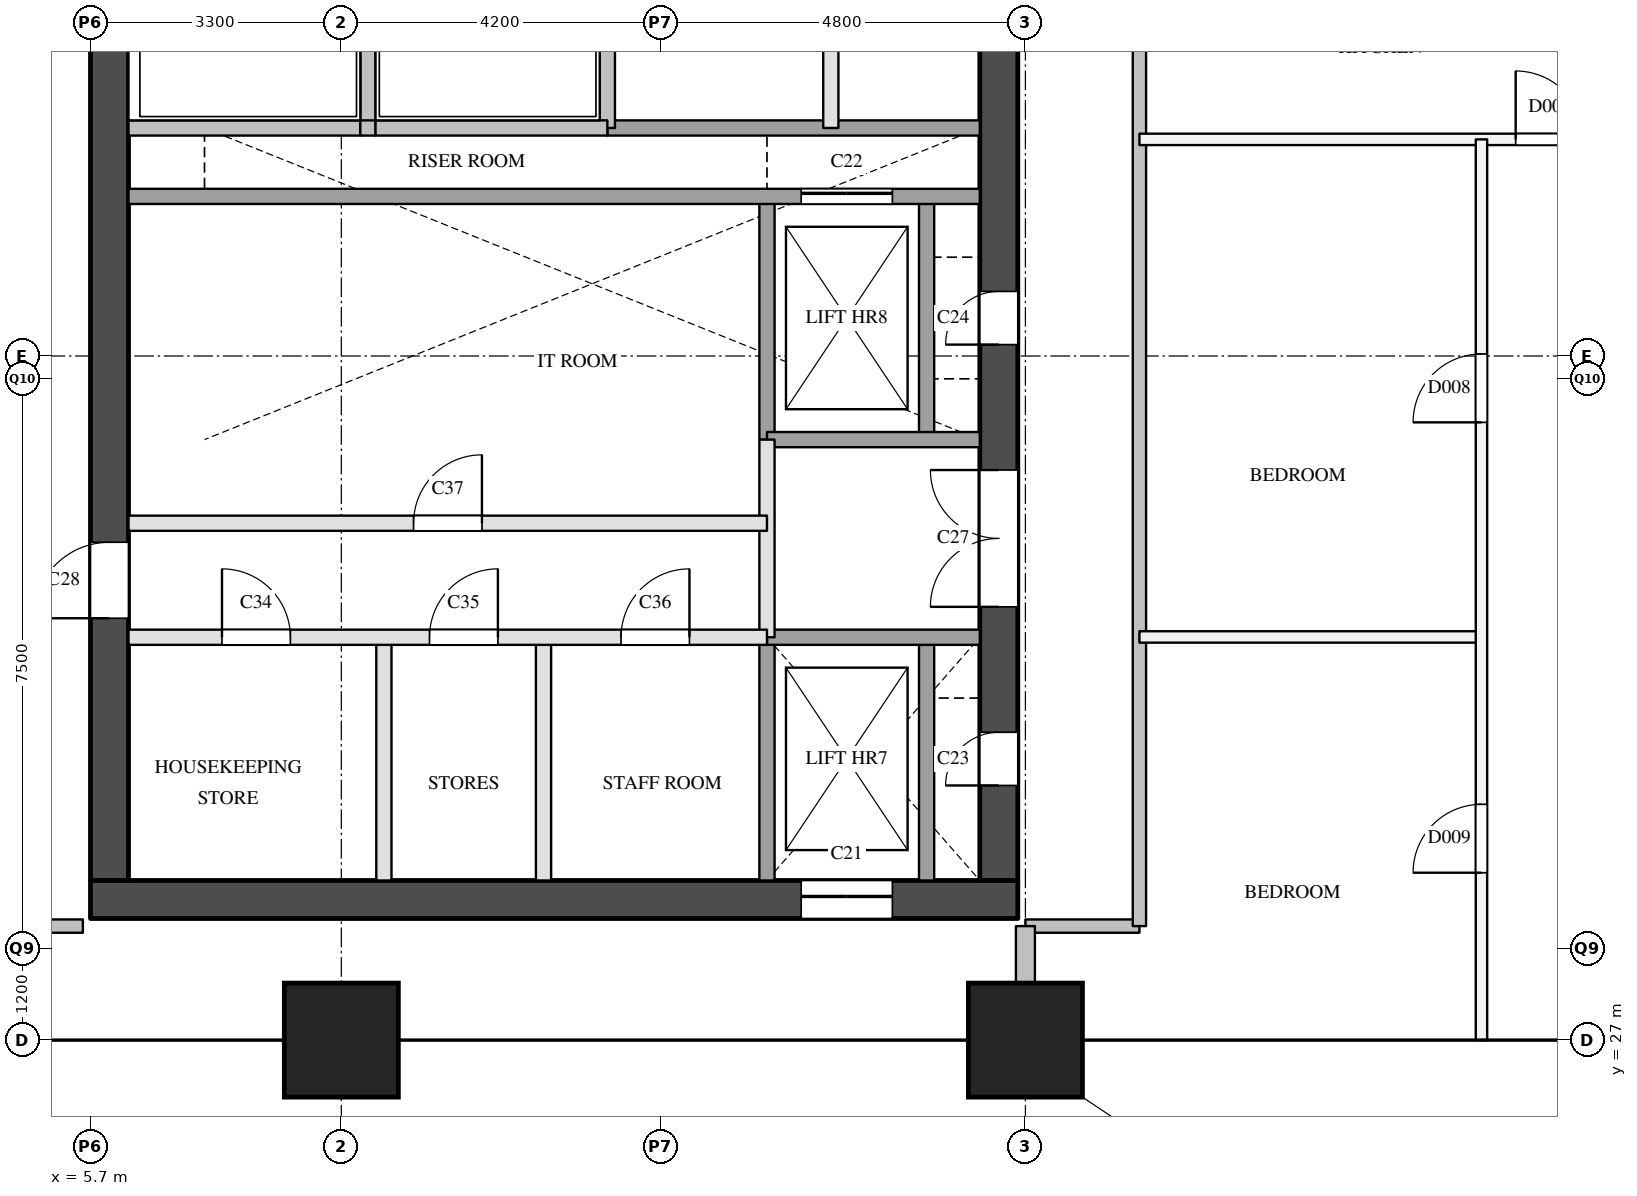
"""IFC4 building model, lengths in metres.
Left out: names, types, materials, properties, quantities, classifications, styles, units other than length and angle.
Written with IfcOpenShell. Run it as: python <this file> out.ifc"""

import sys

from ifc_helpers import new_model, si_unit, direction, frame, frame_2d, origin, origin_2d, place, context, subcontext, project, spatial, rectangle, extrude, element, fill, save


model = new_model("IFC4")
c1 = context("Model", 3, precision=1e-05, world=origin(), true_north=direction((0.0, 1.0)))
c2 = subcontext(c1, "Body", "Model", "MODEL_VIEW")
j1 = project(units=[si_unit("LENGTHUNIT", "METRE"), si_unit("PLANEANGLEUNIT", "RADIAN")], contexts=[c1])
p1 = place(None, origin())
s1 = spatial("IfcSite", under=j1, at=p1, CompositionType="ELEMENT")
p2 = place(p1, origin())
s2 = spatial("IfcBuilding", under=s1, at=p2, CompositionType="ELEMENT")
p3 = place(p2, frame((0.0, 0.0, 154.4)))
s3 = spatial("IfcBuildingStorey", under=s2, at=p3, CompositionType="ELEMENT", Elevation=154.4)
for number, where, z_axis, x_axis in (
    (1, (9.0, 27.0, 0.0), (0.0, 0.0, 1.0), (1.0, 0.0, 0.0)),
    (2, (18.0, 27.0, 0.0), (0.0, 0.0, 1.0), (1.0, 0.0, 0.0)),
):
    element("IfcColumn", number, at=place(p3, frame(where, z_axis=z_axis, x_axis=x_axis)), inside=s3, PredefinedType="COLUMN", context=c2, shape_type="SweptSolid", body=[
        extrude(rectangle(XDim=1.5, YDim=1.5, at=origin_2d()), origin(), (0.0, 0.0, 1.0), 3.9),
    ])
p4 = place(p3, frame((5.7, 28.85, 0.0), z_axis=(0.0, 0.0, 1.0), x_axis=(1.0, 0.0, 0.0)))
e3 = element("IfcWall", 3, at=p4, inside=s3, PredefinedType="SHEAR", context=c2, shape_type="SweptSolid", body=[
    extrude(rectangle(XDim=12.2, YDim=0.5, at=frame_2d((6.1, 0.0))), origin(), (0.0, 0.0, 1.0), 3.6),
])
p5 = place(p4, frame((9.35, 0.0, 0.0)))
e4 = element("IfcOpeningElement", 4, at=p5, cuts=e3, PredefinedType="OPENING", context=c2, shape_type="SweptSolid", body=[
    extrude(rectangle(XDim=1.2, YDim=2.1, at=frame_2d((0.6, 1.05))), frame((0.0, 0.26, 0.0), z_axis=(0.0, -1.0, 0.0), x_axis=(1.0, 0.0, 0.0)), (0.0, 0.0, 1.0), 0.52),
])
p6 = place(p3, frame((5.95, 29.1, 0.0), z_axis=(0.0, 0.0, 1.0), x_axis=(0.0, 1.0, 0.0)))
e5 = element("IfcWall", 5, at=p6, inside=s3, PredefinedType="SHEAR", context=c2, shape_type="SweptSolid", body=[
    extrude(rectangle(XDim=20.3, YDim=0.5, at=frame_2d((10.15, 0.0))), origin(), (0.0, 0.0, 1.0), 3.6),
])
p7 = place(p6, frame((3.45, 0.0, 0.0)))
e6 = element("IfcOpeningElement", 6, at=p7, cuts=e5, PredefinedType="OPENING", context=c2, shape_type="SweptSolid", body=[
    extrude(rectangle(XDim=1.0, YDim=2.1, at=frame_2d((0.5, 1.05))), frame((0.0, 0.26, 0.0), z_axis=(0.0, -1.0, 0.0), x_axis=(1.0, 0.0, 0.0)), (0.0, 0.0, 1.0), 0.52),
])
p8 = place(p6, frame((16.4, 0.0, 0.0)))
e7 = element("IfcOpeningElement", 7, at=p8, cuts=e5, PredefinedType="OPENING", context=c2, shape_type="SweptSolid", body=[
    extrude(rectangle(XDim=1.0, YDim=2.1, at=frame_2d((0.5, 1.05))), frame((0.0, 0.26, 0.0), z_axis=(0.0, -1.0, 0.0), x_axis=(1.0, 0.0, 0.0)), (0.0, 0.0, 1.0), 0.52),
])
p9 = place(p3, frame((17.65, 29.1, 0.0), z_axis=(0.0, 0.0, 1.0), x_axis=(0.0, 1.0, 0.0)))
e8 = element("IfcWall", 8, at=p9, inside=s3, PredefinedType="SHEAR", context=c2, shape_type="SweptSolid", body=[
    extrude(rectangle(XDim=20.3, YDim=0.5, at=frame_2d((10.15, 0.0))), origin(), (0.0, 0.0, 1.0), 3.6),
])
p10 = place(p9, frame((1.25, 0.0, 0.0)))
e9 = element("IfcOpeningElement", 9, at=p10, cuts=e8, PredefinedType="OPENING", context=c2, shape_type="SweptSolid", body=[
    extrude(rectangle(XDim=0.7, YDim=2.1, at=frame_2d((0.35, 1.05))), frame((0.0, 0.26, 0.0), z_axis=(0.0, -1.0, 0.0), x_axis=(1.0, 0.0, 0.0)), (0.0, 0.0, 1.0), 0.52),
])
p11 = place(p9, frame((7.05, 0.0, 0.0)))
e10 = element("IfcOpeningElement", 10, at=p11, cuts=e8, PredefinedType="OPENING", context=c2, shape_type="SweptSolid", body=[
    extrude(rectangle(XDim=0.7, YDim=2.1, at=frame_2d((0.35, 1.05))), frame((0.0, 0.26, 0.0), z_axis=(0.0, -1.0, 0.0), x_axis=(1.0, 0.0, 0.0)), (0.0, 0.0, 1.0), 0.52),
])
p12 = place(p9, frame((3.6, 0.0, 0.0)))
e11 = element("IfcOpeningElement", 11, at=p12, cuts=e8, PredefinedType="OPENING", context=c2, shape_type="SweptSolid", body=[
    extrude(rectangle(XDim=1.8, YDim=2.1, at=frame_2d((0.9, 1.05))), frame((0.0, 0.26, 0.0), z_axis=(0.0, -1.0, 0.0), x_axis=(1.0, 0.0, 0.0)), (0.0, 0.0, 1.0), 0.52),
])
p13 = place(p3, frame((9.35, 39.0, 0.0), z_axis=(0.0, 0.0, 1.0), x_axis=(0.0, 1.0, 0.0)))
e12 = element("IfcWall", 12, at=p13, inside=s3, PredefinedType="SOLIDWALL", context=c2, shape_type="SweptSolid", body=[
    extrude(rectangle(XDim=1.9, YDim=0.2, at=frame_2d((0.95, 0.0))), origin(), (0.0, 0.0, 1.0), 3.6),
])
for number, where, z_axis, x_axis in (
    (13, (9.56, 29.1, 0.0), (0.0, 0.0, 1.0), (0.0, 1.0, 0.0)),
    (14, (11.66, 29.1, 0.0), (0.0, 0.0, 1.0), (0.0, 1.0, 0.0)),
):
    element("IfcWall", number, at=place(p3, frame(where, z_axis=z_axis, x_axis=x_axis)), inside=s3, PredefinedType="PARTITIONING", context=c2, shape_type="SweptSolid", body=[
        extrude(rectangle(XDim=3.2, YDim=0.2, at=frame_2d((1.6, 0.0))), origin(), (0.0, 0.0, 1.0), 3.6),
    ])
p14 = place(p3, frame((12.5, 39.0, 0.0), z_axis=(0.0, 0.0, 1.0), x_axis=(0.0, 1.0, 0.0)))
e15 = element("IfcWall", 15, at=p14, inside=s3, PredefinedType="SOLIDWALL", context=c2, shape_type="SweptSolid", body=[
    extrude(rectangle(XDim=1.9, YDim=0.2, at=frame_2d((0.95, 0.0))), origin(), (0.0, 0.0, 1.0), 3.6),
])
p15 = place(p3, frame((14.6, 32.3, 0.0), z_axis=(0.0, 0.0, 1.0), x_axis=(0.0, 1.0, 0.0)))
e16 = element("IfcWall", 16, at=p15, inside=s3, PredefinedType="PARTITIONING", context=c2, shape_type="SweptSolid", body=[
    extrude(rectangle(XDim=2.6, YDim=0.2, at=frame_2d((1.3, 0.0))), origin(), (0.0, 0.0, 1.0), 3.6),
])
p16 = place(p3, frame((14.6, 29.1, 0.0), z_axis=(0.0, 0.0, 1.0), x_axis=(0.0, 1.0, 0.0)))
e17 = element("IfcWall", 17, at=p16, inside=s3, PredefinedType="SOLIDWALL", context=c2, shape_type="SweptSolid", body=[
    extrude(rectangle(XDim=3.2, YDim=0.2, at=frame_2d((1.6, 0.0))), origin(), (0.0, 0.0, 1.0), 3.6),
])
p17 = place(p3, frame((14.6, 34.9, 0.0), z_axis=(0.0, 0.0, 1.0), x_axis=(0.0, 1.0, 0.0)))
e18 = element("IfcWall", 18, at=p17, inside=s3, PredefinedType="SOLIDWALL", context=c2, shape_type="SweptSolid", body=[
    extrude(rectangle(XDim=3.2, YDim=0.2, at=frame_2d((1.6, 0.0))), origin(), (0.0, 0.0, 1.0), 3.6),
])
p18 = place(p3, frame((15.44, 39.0, 0.0), z_axis=(0.0, 0.0, 1.0), x_axis=(0.0, 1.0, 0.0)))
e19 = element("IfcWall", 19, at=p18, inside=s3, PredefinedType="PARTITIONING", context=c2, shape_type="SweptSolid", body=[
    extrude(rectangle(XDim=6.2, YDim=0.2, at=frame_2d((3.1, 0.0))), origin(), (0.0, 0.0, 1.0), 3.6),
])
p19 = place(p3, frame((16.7, 29.1, 0.0), z_axis=(0.0, 0.0, 1.0), x_axis=(0.0, 1.0, 0.0)))
e20 = element("IfcWall", 20, at=p19, inside=s3, PredefinedType="SOLIDWALL", context=c2, shape_type="SweptSolid", body=[
    extrude(rectangle(XDim=3.2, YDim=0.2, at=frame_2d((1.6, 0.0))), origin(), (0.0, 0.0, 1.0), 3.6),
])
p20 = place(p3, frame((16.7, 34.9, 0.0), z_axis=(0.0, 0.0, 1.0), x_axis=(0.0, 1.0, 0.0)))
e21 = element("IfcWall", 21, at=p20, inside=s3, PredefinedType="SOLIDWALL", context=c2, shape_type="SweptSolid", body=[
    extrude(rectangle(XDim=3.2, YDim=0.2, at=frame_2d((1.6, 0.0))), origin(), (0.0, 0.0, 1.0), 3.6),
])
p21 = place(p3, frame((6.2, 32.3, 0.0), z_axis=(0.0, 0.0, 1.0), x_axis=(1.0, 0.0, 0.0)))
e22 = element("IfcWall", 22, at=p21, inside=s3, PredefinedType="PARTITIONING", context=c2, shape_type="SweptSolid", body=[
    extrude(rectangle(XDim=8.4, YDim=0.2, at=frame_2d((4.2, 0.0))), origin(), (0.0, 0.0, 1.0), 3.6),
])
p22 = place(p21, frame((1.23, 0.0, 0.0)))
e23 = element("IfcOpeningElement", 23, at=p22, cuts=e22, PredefinedType="OPENING", context=c2, shape_type="SweptSolid", body=[
    extrude(rectangle(XDim=0.9, YDim=2.1, at=frame_2d((0.45, 1.05))), frame((0.0, 0.11, 0.0), z_axis=(0.0, -1.0, 0.0), x_axis=(1.0, 0.0, 0.0)), (0.0, 0.0, 1.0), 0.22),
])
p23 = place(p21, frame((3.96, 0.0, 0.0)))
e24 = element("IfcOpeningElement", 24, at=p23, cuts=e22, PredefinedType="OPENING", context=c2, shape_type="SweptSolid", body=[
    extrude(rectangle(XDim=0.9, YDim=2.1, at=frame_2d((0.45, 1.05))), frame((0.0, 0.11, 0.0), z_axis=(0.0, -1.0, 0.0), x_axis=(1.0, 0.0, 0.0)), (0.0, 0.0, 1.0), 0.22),
])
p24 = place(p21, frame((6.48, 0.0, 0.0)))
e25 = element("IfcOpeningElement", 25, at=p24, cuts=e22, PredefinedType="OPENING", context=c2, shape_type="SweptSolid", body=[
    extrude(rectangle(XDim=0.9, YDim=2.1, at=frame_2d((0.45, 1.05))), frame((0.0, 0.11, 0.0), z_axis=(0.0, -1.0, 0.0), x_axis=(1.0, 0.0, 0.0)), (0.0, 0.0, 1.0), 0.22),
])
p25 = place(p3, frame((14.6, 32.3, 0.0), z_axis=(0.0, 0.0, 1.0), x_axis=(1.0, 0.0, 0.0)))
e26 = element("IfcWall", 26, at=p25, inside=s3, PredefinedType="SOLIDWALL", context=c2, shape_type="SweptSolid", body=[
    extrude(rectangle(XDim=2.8, YDim=0.2, at=frame_2d((1.4, 0.0))), origin(), (0.0, 0.0, 1.0), 3.6),
])
p26 = place(p3, frame((6.2, 33.8, 0.0), z_axis=(0.0, 0.0, 1.0), x_axis=(1.0, 0.0, 0.0)))
e27 = element("IfcWall", 27, at=p26, inside=s3, PredefinedType="PARTITIONING", context=c2, shape_type="SweptSolid", body=[
    extrude(rectangle(XDim=8.4, YDim=0.2, at=frame_2d((4.2, 0.0))), origin(), (0.0, 0.0, 1.0), 3.6),
])
p27 = place(p26, frame((3.75, 0.0, 0.0)))
e28 = element("IfcOpeningElement", 28, at=p27, cuts=e27, PredefinedType="OPENING", context=c2, shape_type="SweptSolid", body=[
    extrude(rectangle(XDim=0.9, YDim=2.1, at=frame_2d((0.45, 1.05))), frame((0.0, 0.11, 0.0), z_axis=(0.0, -1.0, 0.0), x_axis=(1.0, 0.0, 0.0)), (0.0, 0.0, 1.0), 0.22),
])
p28 = place(p3, frame((14.6, 34.9, 0.0), z_axis=(0.0, 0.0, 1.0), x_axis=(1.0, 0.0, 0.0)))
e29 = element("IfcWall", 29, at=p28, inside=s3, PredefinedType="SOLIDWALL", context=c2, shape_type="SweptSolid", body=[
    extrude(rectangle(XDim=2.8, YDim=0.2, at=frame_2d((1.4, 0.0))), origin(), (0.0, 0.0, 1.0), 3.6),
])
p29 = place(p3, frame((6.2, 38.1, 0.0), z_axis=(0.0, 0.0, 1.0), x_axis=(1.0, 0.0, 0.0)))
e30 = element("IfcWall", 30, at=p29, inside=s3, PredefinedType="SOLIDWALL", context=c2, shape_type="SweptSolid", body=[
    extrude(rectangle(XDim=11.2, YDim=0.2, at=frame_2d((5.6, 0.0))), origin(), (0.0, 0.0, 1.0), 3.6),
])
p30 = place(p29, frame((8.85, 0.0, 0.0)))
e31 = element("IfcOpeningElement", 31, at=p30, cuts=e30, PredefinedType="OPENING", context=c2, shape_type="SweptSolid", body=[
    extrude(rectangle(XDim=1.2, YDim=2.1, at=frame_2d((0.6, 1.05))), frame((0.0, 0.11, 0.0), z_axis=(0.0, -1.0, 0.0), x_axis=(1.0, 0.0, 0.0)), (0.0, 0.0, 1.0), 0.22),
])
p31 = place(p3, frame((12.5, 39.0, 0.0), z_axis=(0.0, 0.0, 1.0), x_axis=(1.0, 0.0, 0.0)))
e32 = element("IfcWall", 32, at=p31, inside=s3, PredefinedType="SOLIDWALL", context=c2, shape_type="SweptSolid", body=[
    extrude(rectangle(XDim=4.9, YDim=0.2, at=frame_2d((2.45, 0.0))), origin(), (0.0, 0.0, 1.0), 3.6),
])
p32 = place(p3, frame((6.2, 39.0, 0.0), z_axis=(0.0, 0.0, 1.0), x_axis=(1.0, 0.0, 0.0)))
e33 = element("IfcWall", 33, at=p32, inside=s3, PredefinedType="SOLIDWALL", context=c2, shape_type="SweptSolid", body=[
    extrude(rectangle(XDim=3.05, YDim=0.2, at=frame_2d((1.525, 0.0))), origin(), (0.0, 0.0, 1.0), 3.6),
])
p33 = place(p3, frame((9.25, 39.0, 0.0), z_axis=(0.0, 0.0, 1.0), x_axis=(1.0, 0.0, 0.0)))
e34 = element("IfcWall", 34, at=p33, inside=s3, PredefinedType="SOLIDWALL", context=c2, shape_type="SweptSolid", body=[
    extrude(rectangle(XDim=0.2, YDim=0.2, at=frame_2d((0.1, 0.0))), origin(), (0.0, 0.0, 1.0), 3.6),
])
p34 = place(p3, frame((9.45, 39.0, 0.0), z_axis=(0.0, 0.0, 1.0), x_axis=(1.0, 0.0, 0.0)))
e35 = element("IfcWall", 35, at=p34, inside=s3, PredefinedType="SOLIDWALL", context=c2, shape_type="SweptSolid", body=[
    extrude(rectangle(XDim=3.05, YDim=0.2, at=frame_2d((1.525, 0.0))), origin(), (0.0, 0.0, 1.0), 3.6),
])
for number, where, z_axis, x_axis in (
    (36, (4.1, 28.5, 0.0), (0.0, 0.0, 1.0), (1.0, 0.0, 0.0)),
    (37, (18.0, 28.5, 0.0), (0.0, 0.0, 1.0), (1.0, 0.0, 0.0)),
):
    element("IfcWall", number, at=place(p3, frame(where, z_axis=z_axis, x_axis=x_axis)), inside=s3, PredefinedType="PARTITIONING", context=c2, shape_type="SweptSolid", body=[
        extrude(rectangle(XDim=1.5, YDim=0.175, at=frame_2d((0.75, 0.0))), origin(), (0.0, 0.0, 1.0), 3.6),
    ])
p35 = place(p3, frame((19.5, 28.5, 0.0), z_axis=(0.0, 0.0, 1.0), x_axis=(0.0, 1.0, 0.0)))
e38 = element("IfcWall", 38, at=p35, inside=s3, PredefinedType="PARTITIONING", context=c2, shape_type="SweptSolid", body=[
    extrude(rectangle(XDim=12.75, YDim=0.175, at=frame_2d((6.375, 0.0))), origin(), (0.0, 0.0, 1.0), 3.6),
])
p36 = place(p3, frame((19.5, 32.304, 0.0), z_axis=(0.0, 0.0, 1.0), x_axis=(1.0, 0.0, 0.0)))
e39 = element("IfcWall", 39, at=p36, inside=s3, PredefinedType="PARTITIONING", context=c2, shape_type="SweptSolid", body=[
    extrude(rectangle(XDim=4.5, YDim=0.15, at=frame_2d((2.25, 0.0))), origin(), (0.0, 0.0, 1.0), 3.6),
])
p37 = place(p3, frame((19.5, 38.85, 0.0), z_axis=(0.0, 0.0, 1.0), x_axis=(1.0, 0.0, 0.0)))
e40 = element("IfcWall", 40, at=p37, inside=s3, PredefinedType="PARTITIONING", context=c2, shape_type="SweptSolid", body=[
    extrude(rectangle(XDim=6.3, YDim=0.15, at=frame_2d((3.15, 0.0))), origin(), (0.0, 0.0, 1.0), 3.6),
])
p38 = place(p37, frame((4.95, 0.0, 0.0)))
e41 = element("IfcOpeningElement", 41, at=p38, cuts=e40, PredefinedType="OPENING", context=c2, shape_type="SweptSolid", body=[
    extrude(rectangle(XDim=0.9, YDim=2.1, at=frame_2d((0.45, 1.05))), frame((0.0, 0.085, 0.0), z_axis=(0.0, -1.0, 0.0), x_axis=(1.0, 0.0, 0.0)), (0.0, 0.0, 1.0), 0.17),
])
p39 = place(p3, frame((24.0, 27.0, 0.0), z_axis=(0.0, 0.0, 1.0), x_axis=(0.0, 1.0, 0.0)))
e42 = element("IfcWall", 42, at=p39, inside=s3, PredefinedType="PARTITIONING", context=c2, shape_type="SweptSolid", body=[
    extrude(rectangle(XDim=11.85, YDim=0.15, at=frame_2d((5.925, 0.0))), origin(), (0.0, 0.0, 1.0), 2.6),
])
p40 = place(p39, frame((8.127, 0.0, 0.0)))
e43 = element("IfcOpeningElement", 43, at=p40, cuts=e42, PredefinedType="OPENING", context=c2, shape_type="SweptSolid", body=[
    extrude(rectangle(XDim=0.9, YDim=2.1, at=frame_2d((0.45, 1.05))), frame((0.0, 0.085, 0.0), z_axis=(0.0, -1.0, 0.0), x_axis=(1.0, 0.0, 0.0)), (0.0, 0.0, 1.0), 0.17),
])
p41 = place(p39, frame((2.202, 0.0, 0.0)))
e44 = element("IfcOpeningElement", 44, at=p41, cuts=e42, PredefinedType="OPENING", context=c2, shape_type="SweptSolid", body=[
    extrude(rectangle(XDim=0.9, YDim=2.1, at=frame_2d((0.45, 1.05))), frame((0.0, 0.085, 0.0), z_axis=(0.0, -1.0, 0.0), x_axis=(1.0, 0.0, 0.0)), (0.0, 0.0, 1.0), 0.17),
])
p42 = place(p3, frame((18.0, 27.0, 0.0), z_axis=(0.0, 0.0, 1.0), x_axis=(0.0, 1.0, 0.0)))
e45 = element("IfcWall", 45, at=p42, inside=s3, PredefinedType="PARTITIONING", context=c2, shape_type="SweptSolid", body=[
    extrude(rectangle(XDim=1.5, YDim=0.25, at=frame_2d((0.75, 0.0))), origin(), (0.0, 0.0, 1.0), 3.6),
])
p43 = place(p5, origin())
e46 = element("IfcDoor", 46, at=p43, inside=s3, OperationType="SLIDING_TO_LEFT", PredefinedType="DOOR", context=c2, shape_type="SweptSolid", body=[
    extrude(rectangle(XDim=1.2, YDim=2.1, at=frame_2d((0.6, 1.05))), frame((0.0, 0.025, 0.0), z_axis=(0.0, -1.0, 0.0), x_axis=(1.0, 0.0, 0.0)), (0.0, 0.0, 1.0), 0.05),
])
fill(e4, e46)
p44 = place(p30, origin())
e47 = element("IfcDoor", 47, at=p44, inside=s3, OperationType="SLIDING_TO_LEFT", PredefinedType="DOOR", context=c2, shape_type="SweptSolid", body=[
    extrude(rectangle(XDim=1.2, YDim=2.1, at=frame_2d((0.6, 1.05))), frame((0.0, 0.025, 0.0), z_axis=(0.0, -1.0, 0.0), x_axis=(1.0, 0.0, 0.0)), (0.0, 0.0, 1.0), 0.05),
])
fill(e31, e47)
p45 = place(p10, origin())
e48 = element("IfcDoor", 48, at=p45, inside=s3, OperationType="SINGLE_SWING_LEFT", PredefinedType="DOOR", context=c2, shape_type="SweptSolid", body=[
    extrude(rectangle(XDim=0.7, YDim=2.1, at=frame_2d((0.35, 1.05))), frame((0.0, 0.025, 0.0), z_axis=(0.0, -1.0, 0.0), x_axis=(1.0, 0.0, 0.0)), (0.0, 0.0, 1.0), 0.05),
])
fill(e9, e48)
p46 = place(p11, origin())
e49 = element("IfcDoor", 49, at=p46, inside=s3, OperationType="SINGLE_SWING_LEFT", PredefinedType="DOOR", context=c2, shape_type="SweptSolid", body=[
    extrude(rectangle(XDim=0.7, YDim=2.1, at=frame_2d((0.35, 1.05))), frame((0.0, 0.025, 0.0), z_axis=(0.0, -1.0, 0.0), x_axis=(1.0, 0.0, 0.0)), (0.0, 0.0, 1.0), 0.05),
])
fill(e10, e49)
p47 = place(p12, origin())
e50 = element("IfcDoor", 50, at=p47, inside=s3, OperationType="DOUBLE_DOOR_SINGLE_SWING", PredefinedType="DOOR", context=c2, shape_type="SweptSolid", body=[
    extrude(rectangle(XDim=1.8, YDim=2.1, at=frame_2d((0.9, 1.05))), frame((0.0, 0.025, 0.0), z_axis=(0.0, -1.0, 0.0), x_axis=(1.0, 0.0, 0.0)), (0.0, 0.0, 1.0), 0.05),
])
fill(e11, e50)
p48 = place(p7, origin())
e51 = element("IfcDoor", 51, at=p48, inside=s3, OperationType="SINGLE_SWING_LEFT", PredefinedType="DOOR", context=c2, shape_type="SweptSolid", body=[
    extrude(rectangle(XDim=1.0, YDim=2.1, at=frame_2d((0.5, 1.05))), frame((0.0, 0.025, 0.0), z_axis=(0.0, -1.0, 0.0), x_axis=(1.0, 0.0, 0.0)), (0.0, 0.0, 1.0), 0.05),
])
fill(e6, e51)
p49 = place(p22, origin())
e52 = element("IfcDoor", 52, at=p49, inside=s3, OperationType="SINGLE_SWING_LEFT", PredefinedType="DOOR", context=c2, shape_type="SweptSolid", body=[
    extrude(rectangle(XDim=0.9, YDim=2.1, at=frame_2d((0.45, 1.05))), frame((0.0, 0.025, 0.0), z_axis=(0.0, -1.0, 0.0), x_axis=(1.0, 0.0, 0.0)), (0.0, 0.0, 1.0), 0.05),
])
fill(e23, e52)
p50 = place(p23, origin())
e53 = element("IfcDoor", 53, at=p50, inside=s3, OperationType="SINGLE_SWING_RIGHT", PredefinedType="DOOR", context=c2, shape_type="SweptSolid", body=[
    extrude(rectangle(XDim=0.9, YDim=2.1, at=frame_2d((0.45, 1.05))), frame((0.0, 0.025, 0.0), z_axis=(0.0, -1.0, 0.0), x_axis=(1.0, 0.0, 0.0)), (0.0, 0.0, 1.0), 0.05),
])
fill(e24, e53)
p51 = place(p24, origin())
e54 = element("IfcDoor", 54, at=p51, inside=s3, OperationType="SINGLE_SWING_RIGHT", PredefinedType="DOOR", context=c2, shape_type="SweptSolid", body=[
    extrude(rectangle(XDim=0.9, YDim=2.1, at=frame_2d((0.45, 1.05))), frame((0.0, 0.025, 0.0), z_axis=(0.0, -1.0, 0.0), x_axis=(1.0, 0.0, 0.0)), (0.0, 0.0, 1.0), 0.05),
])
fill(e25, e54)
p52 = place(p27, origin())
e55 = element("IfcDoor", 55, at=p52, inside=s3, OperationType="SINGLE_SWING_RIGHT", PredefinedType="DOOR", context=c2, shape_type="SweptSolid", body=[
    extrude(rectangle(XDim=0.9, YDim=2.1, at=frame_2d((0.45, 1.05))), frame((0.0, 0.025, 0.0), z_axis=(0.0, -1.0, 0.0), x_axis=(1.0, 0.0, 0.0)), (0.0, 0.0, 1.0), 0.05),
])
fill(e28, e55)
p53 = place(p38, origin())
e56 = element("IfcDoor", 56, at=p53, inside=s3, OperationType="SINGLE_SWING_LEFT", PredefinedType="DOOR", context=c2, shape_type="SweptSolid", body=[
    extrude(rectangle(XDim=0.9, YDim=2.1, at=frame_2d((0.45, 1.05))), frame((0.0, 0.025, 0.0), z_axis=(0.0, -1.0, 0.0), x_axis=(1.0, 0.0, 0.0)), (0.0, 0.0, 1.0), 0.05),
])
fill(e41, e56)
p54 = place(p40, origin())
e57 = element("IfcDoor", 57, at=p54, inside=s3, OperationType="SINGLE_SWING_LEFT", PredefinedType="DOOR", context=c2, shape_type="SweptSolid", body=[
    extrude(rectangle(XDim=0.9, YDim=2.1, at=frame_2d((0.45, 1.05))), frame((0.0, 0.025, 0.0), z_axis=(0.0, -1.0, 0.0), x_axis=(1.0, 0.0, 0.0)), (0.0, 0.0, 1.0), 0.05),
])
fill(e43, e57)
p55 = place(p41, origin())
e58 = element("IfcDoor", 58, at=p55, inside=s3, OperationType="SINGLE_SWING_LEFT", PredefinedType="DOOR", context=c2, shape_type="SweptSolid", body=[
    extrude(rectangle(XDim=0.9, YDim=2.1, at=frame_2d((0.45, 1.05))), frame((0.0, 0.025, 0.0), z_axis=(0.0, -1.0, 0.0), x_axis=(1.0, 0.0, 0.0)), (0.0, 0.0, 1.0), 0.05),
])
fill(e44, e58)
save(model, sys.argv[1])
